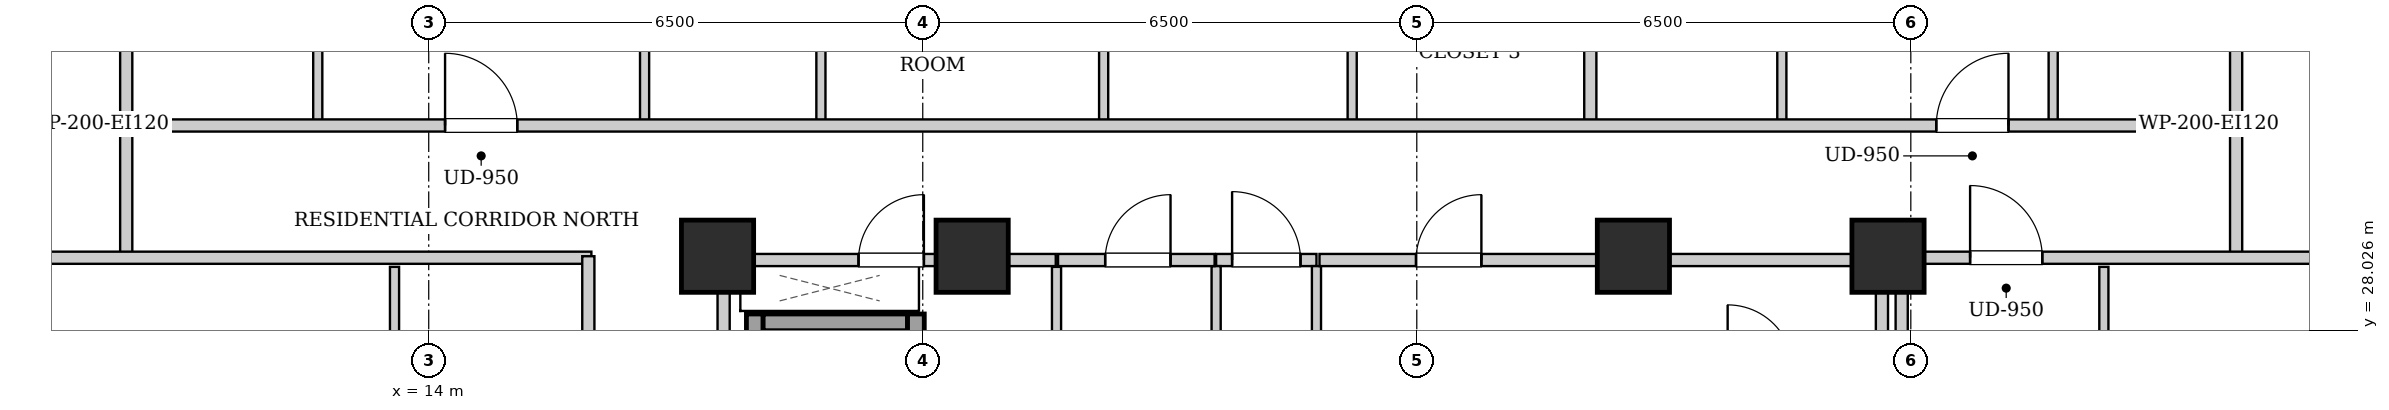
"""IFC4 building model, lengths in metres.
Left out: names, types, materials, properties, quantities, classifications, styles, units other than length and angle.
Written with IfcOpenShell. Run it as: python <this file> out.ifc"""

import sys

from ifc_helpers import new_model, si_unit, direction, frame, frame_2d, origin, origin_2d, place, context, subcontext, project, spatial, rectangle, extrude, element, fill, save


model = new_model("IFC4")
c1 = context("Model", 3, precision=1e-05, world=origin(), true_north=direction((0.0, 1.0)))
c2 = subcontext(c1, "Body", "Model", "MODEL_VIEW")
j1 = project(units=[si_unit("LENGTHUNIT", "METRE"), si_unit("PLANEANGLEUNIT", "RADIAN")], contexts=[c1])
p1 = place(None, origin())
s1 = spatial("IfcSite", under=j1, at=p1, CompositionType="ELEMENT")
p2 = place(p1, origin())
s2 = spatial("IfcBuilding", under=s1, at=p2, CompositionType="ELEMENT")
p3 = place(p2, frame((0.0, 0.0, 137.4)))
s3 = spatial("IfcBuildingStorey", under=s2, at=p3, CompositionType="ELEMENT", Elevation=137.4)
for number, where, z_axis, x_axis in (
    (1, (17.8, 29.0, 0.0), (0.0, 0.0, 1.0), (1.0, 0.0, 0.0)),
    (2, (21.15, 29.0, 0.0), (0.0, 0.0, 1.0), (1.0, 0.0, 0.0)),
    (3, (29.85, 29.0, 0.0), (0.0, 0.0, 1.0), (1.0, 0.0, 0.0)),
    (4, (33.2, 29.0, 0.0), (0.0, 0.0, 1.0), (1.0, 0.0, 0.0)),
):
    element("IfcColumn", number, at=place(p3, frame(where, z_axis=z_axis, x_axis=x_axis)), inside=s3, PredefinedType="COLUMN", context=c2, shape_type="SweptSolid", body=[
        extrude(rectangle(XDim=0.95, YDim=0.95, at=origin_2d()), origin(), (0.0, 0.0, 1.0), 3.25),
    ])
p4 = place(p3, frame((18.29, 24.1, 0.0), z_axis=(0.0, 0.0, 1.0), x_axis=(0.0, 1.0, 0.0)))
e5 = element("IfcWall", 5, at=p4, inside=s3, PredefinedType="SHEAR", context=c2, shape_type="SweptSolid", body=[
    extrude(rectangle(XDim=4.14, YDim=0.22, at=frame_2d((2.07, 0.0))), origin(), (0.0, 0.0, 1.0), 2.99),
])
p5 = place(p3, frame((18.4, 28.13, 0.0), z_axis=(0.0, 0.0, 1.0), x_axis=(1.0, 0.0, 0.0)))
e6 = element("IfcWall", 6, at=p5, inside=s3, PredefinedType="SHEAR", context=c2, shape_type="SweptSolid", body=[
    extrude(rectangle(XDim=1.9, YDim=0.22, at=frame_2d((0.95, 0.0))), origin(), (0.0, 0.0, 1.0), 2.99),
])
p6 = place(p3, frame((20.41, 26.06, 0.0), z_axis=(0.0, 0.0, 1.0), x_axis=(0.0, 1.0, 0.0)))
e7 = element("IfcWall", 7, at=p6, inside=s3, PredefinedType="SHEAR", context=c2, shape_type="SweptSolid", body=[
    extrude(rectangle(XDim=2.18, YDim=0.22, at=frame_2d((1.09, 0.0))), origin(), (0.0, 0.0, 1.0), 2.99),
])
for number, where, z_axis, x_axis in (
    (8, (17.88, 24.12, 0.0), (0.0, 0.0, 1.0), (0.0, 1.0, 0.0)),
    (9, (33.12, 24.12, 0.0), (0.0, 0.0, 1.0), (0.0, 1.0, 0.0)),
):
    element("IfcWall", number, at=place(p3, frame(where, z_axis=z_axis, x_axis=x_axis)), inside=s3, PredefinedType="PARTITIONING", context=c2, shape_type="SweptSolid", body=[
        extrude(rectangle(XDim=4.76, YDim=0.16, at=frame_2d((2.38, 0.0))), origin(), (0.0, 0.0, 1.0), 2.325),
    ])
p7 = place(p3, frame((24.36, 28.95, 0.0), z_axis=(0.0, 0.0, 1.0), x_axis=(1.0, 0.0, 0.0)))
e10 = element("IfcWall", 10, at=p7, inside=s3, PredefinedType="PARTITIONING", context=c2, shape_type="SweptSolid", body=[
    extrude(rectangle(XDim=1.32, YDim=0.16, at=frame_2d((0.66, 0.0))), origin(), (0.0, 0.0, 1.0), 2.426),
])
p8 = place(p7, frame((0.21, 0.0, 0.0)))
e11 = element("IfcOpeningElement", 11, at=p8, cuts=e10, PredefinedType="OPENING", context=c2, shape_type="SweptSolid", body=[
    extrude(rectangle(XDim=0.9, YDim=2.05, at=frame_2d((0.45, 1.025))), frame((0.0, 0.09, 0.0), z_axis=(0.0, -1.0, 0.0), x_axis=(1.0, 0.0, 0.0)), (0.0, 0.0, 1.0), 0.18),
])
p9 = place(p3, frame((17.96, 28.95, 0.0), z_axis=(0.0, 0.0, 1.0), x_axis=(1.0, 0.0, 0.0)))
e12 = element("IfcWall", 12, at=p9, inside=s3, PredefinedType="PARTITIONING", context=c2, shape_type="SweptSolid", body=[
    extrude(rectangle(XDim=4.29, YDim=0.16, at=frame_2d((2.145, 0.0))), origin(), (0.0, 0.0, 1.0), 2.426),
])
p10 = place(p9, frame((1.695, 0.0, 0.0)))
e13 = element("IfcOpeningElement", 13, at=p10, cuts=e12, PredefinedType="OPENING", context=c2, shape_type="SweptSolid", body=[
    extrude(rectangle(XDim=0.86, YDim=2.05, at=frame_2d((0.43, 1.025))), frame((0.0, 0.09, 0.0), z_axis=(0.0, -1.0, 0.0), x_axis=(1.0, 0.0, 0.0)), (0.0, 0.0, 1.0), 0.18),
])
for number, where, z_axis, x_axis in (
    (14, (24.36, 25.0, 0.0), (0.0, 0.0, 1.0), (0.0, 1.0, 0.0)),
    (15, (25.68, 25.0, 0.0), (0.0, 0.0, 1.0), (0.0, 1.0, 0.0)),
):
    element("IfcWall", number, at=place(p3, frame(where, z_axis=z_axis, x_axis=x_axis)), inside=s3, PredefinedType="PARTITIONING", context=c2, shape_type="SweptSolid", body=[
        extrude(rectangle(XDim=3.87, YDim=0.12, at=frame_2d((1.935, 0.0))), origin(), (0.0, 0.0, 1.0), 2.99),
    ])
p11 = place(p3, frame((22.26, 25.0, 0.0), z_axis=(0.0, 0.0, 1.0), x_axis=(0.0, 1.0, 0.0)))
e16 = element("IfcWall", 16, at=p11, inside=s3, PredefinedType="PARTITIONING", context=c2, shape_type="SweptSolid", body=[
    extrude(rectangle(XDim=3.86, YDim=0.12, at=frame_2d((1.93, 0.0))), origin(), (0.0, 0.0, 1.0), 2.99),
])
p12 = place(p3, frame((22.28, 28.95, 0.0), z_axis=(0.0, 0.0, 1.0), x_axis=(1.0, 0.0, 0.0)))
e17 = element("IfcWall", 17, at=p12, inside=s3, PredefinedType="PARTITIONING", context=c2, shape_type="SweptSolid", body=[
    extrude(rectangle(XDim=2.06, YDim=0.16, at=frame_2d((1.03, 0.0))), origin(), (0.0, 0.0, 1.0), 2.426),
])
p13 = place(p12, frame((0.62, 0.0, 0.0)))
e18 = element("IfcOpeningElement", 18, at=p13, cuts=e17, PredefinedType="OPENING", context=c2, shape_type="SweptSolid", body=[
    extrude(rectangle(XDim=0.86, YDim=2.05, at=frame_2d((0.43, 1.025))), frame((0.0, 0.09, 0.0), z_axis=(0.0, -1.0, 0.0), x_axis=(1.0, 0.0, 0.0)), (0.0, 0.0, 1.0), 0.18),
])
p14 = place(p3, frame((25.72, 28.95, 0.0), z_axis=(0.0, 0.0, 1.0), x_axis=(1.0, 0.0, 0.0)))
e19 = element("IfcWall", 19, at=p14, inside=s3, PredefinedType="PARTITIONING", context=c2, shape_type="SweptSolid", body=[
    extrude(rectangle(XDim=7.32, YDim=0.16, at=frame_2d((3.66, 0.0))), origin(), (0.0, 0.0, 1.0), 2.426),
])
p15 = place(p14, frame((1.27, 0.0, 0.0)))
e20 = element("IfcOpeningElement", 20, at=p15, cuts=e19, PredefinedType="OPENING", context=c2, shape_type="SweptSolid", body=[
    extrude(rectangle(XDim=0.86, YDim=2.05, at=frame_2d((0.43, 1.025))), frame((0.0, 0.09, 0.0), z_axis=(0.0, -1.0, 0.0), x_axis=(1.0, 0.0, 0.0)), (0.0, 0.0, 1.0), 0.18),
])
for number, where, z_axis, x_axis in (
    (21, (10.02, 28.98, 0.0), (0.0, 0.0, 1.0), (0.0, 1.0, 0.0)),
    (22, (37.78, 28.98, 0.0), (0.0, 0.0, 1.0), (0.0, 1.0, 0.0)),
):
    element("IfcWall", number, at=place(p3, frame(where, z_axis=z_axis, x_axis=x_axis)), inside=s3, PredefinedType="PARTITIONING", context=c2, shape_type="SweptSolid", body=[
        extrude(rectangle(XDim=1.74, YDim=0.16, at=frame_2d((0.87, 0.0))), origin(), (0.0, 0.0, 1.0), 2.99),
    ])
p16 = place(p3, frame((7.78, 28.98, 0.0), z_axis=(0.0, 0.0, 1.0), x_axis=(1.0, 0.0, 0.0)))
e23 = element("IfcWall", 23, at=p16, inside=s3, PredefinedType="PARTITIONING", context=c2, shape_type="SweptSolid", body=[
    extrude(rectangle(XDim=8.36, YDim=0.16, at=frame_2d((4.18, 0.0))), origin(), (0.0, 0.0, 1.0), 2.426),
])
p17 = place(p3, frame((10.02, 30.76, 0.0), z_axis=(0.0, 0.0, 1.0), x_axis=(0.0, 1.0, 0.0)))
e24 = element("IfcWall", 24, at=p17, inside=s3, PredefinedType="PARTITIONING", context=c2, shape_type="SweptSolid", body=[
    extrude(rectangle(XDim=2.91, YDim=0.16, at=frame_2d((1.455, 0.0))), origin(), (0.0, 0.0, 1.0), 2.99),
])
p18 = place(p3, frame((12.54, 30.76, 0.0), z_axis=(0.0, 0.0, 1.0), x_axis=(0.0, 1.0, 0.0)))
e25 = element("IfcWall", 25, at=p18, inside=s3, PredefinedType="PARTITIONING", context=c2, shape_type="SweptSolid", body=[
    extrude(rectangle(XDim=2.85, YDim=0.12, at=frame_2d((1.425, 0.0))), origin(), (0.0, 0.0, 1.0), 2.99),
])
p19 = place(p18, frame((0.995, 0.0, 0.0)))
e26 = element("IfcOpeningElement", 26, at=p19, cuts=e25, PredefinedType="OPENING", context=c2, shape_type="SweptSolid", body=[
    extrude(rectangle(XDim=0.86, YDim=2.05, at=frame_2d((0.43, 1.025))), frame((0.0, 0.07, 0.0), z_axis=(0.0, -1.0, 0.0), x_axis=(1.0, 0.0, 0.0)), (0.0, 0.0, 1.0), 0.14),
])
p20 = place(p3, frame((16.84, 30.76, 0.0), z_axis=(0.0, 0.0, 1.0), x_axis=(0.0, 1.0, 0.0)))
e27 = element("IfcWall", 27, at=p20, inside=s3, PredefinedType="PARTITIONING", context=c2, shape_type="SweptSolid", body=[
    extrude(rectangle(XDim=2.85, YDim=0.12, at=frame_2d((1.425, 0.0))), origin(), (0.0, 0.0, 1.0), 2.99),
])
p21 = place(p20, frame((0.975, 0.0, 0.0)))
e28 = element("IfcOpeningElement", 28, at=p21, cuts=e27, PredefinedType="OPENING", context=c2, shape_type="SweptSolid", body=[
    extrude(rectangle(XDim=0.9, YDim=2.05, at=frame_2d((0.45, 1.025))), frame((0.0, 0.07, 0.0), z_axis=(0.0, -1.0, 0.0), x_axis=(1.0, 0.0, 0.0)), (0.0, 0.0, 1.0), 0.14),
])
p22 = place(p3, frame((19.16, 30.76, 0.0), z_axis=(0.0, 0.0, 1.0), x_axis=(0.0, 1.0, 0.0)))
e29 = element("IfcWall", 29, at=p22, inside=s3, PredefinedType="PARTITIONING", context=c2, shape_type="SweptSolid", body=[
    extrude(rectangle(XDim=2.85, YDim=0.12, at=frame_2d((1.425, 0.0))), origin(), (0.0, 0.0, 1.0), 2.99),
])
p23 = place(p22, frame((0.975, 0.0, 0.0)))
e30 = element("IfcOpeningElement", 30, at=p23, cuts=e29, PredefinedType="OPENING", context=c2, shape_type="SweptSolid", body=[
    extrude(rectangle(XDim=0.9, YDim=2.05, at=frame_2d((0.45, 1.025))), frame((0.0, 0.07, 0.0), z_axis=(0.0, -1.0, 0.0), x_axis=(1.0, 0.0, 0.0)), (0.0, 0.0, 1.0), 0.14),
])
p24 = place(p3, frame((22.88, 30.76, 0.0), z_axis=(0.0, 0.0, 1.0), x_axis=(0.0, 1.0, 0.0)))
e31 = element("IfcWall", 31, at=p24, inside=s3, PredefinedType="PARTITIONING", context=c2, shape_type="SweptSolid", body=[
    extrude(rectangle(XDim=2.85, YDim=0.12, at=frame_2d((1.425, 0.0))), origin(), (0.0, 0.0, 1.0), 2.99),
])
p25 = place(p24, frame((0.975, 0.0, 0.0)))
e32 = element("IfcOpeningElement", 32, at=p25, cuts=e31, PredefinedType="OPENING", context=c2, shape_type="SweptSolid", body=[
    extrude(rectangle(XDim=0.9, YDim=2.05, at=frame_2d((0.45, 1.025))), frame((0.0, 0.07, 0.0), z_axis=(0.0, -1.0, 0.0), x_axis=(1.0, 0.0, 0.0)), (0.0, 0.0, 1.0), 0.14),
])
p26 = place(p3, frame((26.15, 30.76, 0.0), z_axis=(0.0, 0.0, 1.0), x_axis=(0.0, 1.0, 0.0)))
e33 = element("IfcWall", 33, at=p26, inside=s3, PredefinedType="PARTITIONING", context=c2, shape_type="SweptSolid", body=[
    extrude(rectangle(XDim=2.85, YDim=0.12, at=frame_2d((1.425, 0.0))), origin(), (0.0, 0.0, 1.0), 2.99),
])
p27 = place(p26, frame((0.975, 0.0, 0.0)))
e34 = element("IfcOpeningElement", 34, at=p27, cuts=e33, PredefinedType="OPENING", context=c2, shape_type="SweptSolid", body=[
    extrude(rectangle(XDim=0.9, YDim=2.05, at=frame_2d((0.45, 1.025))), frame((0.0, 0.07, 0.0), z_axis=(0.0, -1.0, 0.0), x_axis=(1.0, 0.0, 0.0)), (0.0, 0.0, 1.0), 0.14),
])
p28 = place(p3, frame((37.78, 30.76, 0.0), z_axis=(0.0, 0.0, 1.0), x_axis=(0.0, 1.0, 0.0)))
e35 = element("IfcWall", 35, at=p28, inside=s3, PredefinedType="PARTITIONING", context=c2, shape_type="SweptSolid", body=[
    extrude(rectangle(XDim=2.91, YDim=0.16, at=frame_2d((1.455, 0.0))), origin(), (0.0, 0.0, 1.0), 2.99),
])
p29 = place(p3, frame((29.283, 30.76, 0.0), z_axis=(0.0, 0.0, 1.0), x_axis=(0.0, 1.0, 0.0)))
e36 = element("IfcWall", 36, at=p29, inside=s3, PredefinedType="PARTITIONING", context=c2, shape_type="SweptSolid", body=[
    extrude(rectangle(XDim=12.26, YDim=0.16, at=frame_2d((6.13, 0.0))), origin(), (0.0, 0.0, 1.0), 2.99),
])
p30 = place(p3, frame((31.803, 30.76, 0.0), z_axis=(0.0, 0.0, 1.0), x_axis=(0.0, 1.0, 0.0)))
e37 = element("IfcWall", 37, at=p30, inside=s3, PredefinedType="PARTITIONING", context=c2, shape_type="SweptSolid", body=[
    extrude(rectangle(XDim=2.85, YDim=0.12, at=frame_2d((1.425, 0.0))), origin(), (0.0, 0.0, 1.0), 2.99),
])
p31 = place(p30, frame((0.995, 0.0, 0.0)))
e38 = element("IfcOpeningElement", 38, at=p31, cuts=e37, PredefinedType="OPENING", context=c2, shape_type="SweptSolid", body=[
    extrude(rectangle(XDim=0.86, YDim=2.05, at=frame_2d((0.43, 1.025))), frame((0.0, 0.07, 0.0), z_axis=(0.0, -1.0, 0.0), x_axis=(1.0, 0.0, 0.0)), (0.0, 0.0, 1.0), 0.14),
])
p32 = place(p3, frame((35.373, 30.76, 0.0), z_axis=(0.0, 0.0, 1.0), x_axis=(0.0, 1.0, 0.0)))
e39 = element("IfcWall", 39, at=p32, inside=s3, PredefinedType="PARTITIONING", context=c2, shape_type="SweptSolid", body=[
    extrude(rectangle(XDim=2.85, YDim=0.12, at=frame_2d((1.425, 0.0))), origin(), (0.0, 0.0, 1.0), 2.99),
])
p33 = place(p32, frame((0.975, 0.0, 0.0)))
e40 = element("IfcOpeningElement", 40, at=p33, cuts=e39, PredefinedType="OPENING", context=c2, shape_type="SweptSolid", body=[
    extrude(rectangle(XDim=0.9, YDim=2.05, at=frame_2d((0.45, 1.025))), frame((0.0, 0.07, 0.0), z_axis=(0.0, -1.0, 0.0), x_axis=(1.0, 0.0, 0.0)), (0.0, 0.0, 1.0), 0.14),
])
p34 = place(p3, frame((13.55, 24.552, 0.0), z_axis=(0.0, 0.0, 1.0), x_axis=(0.0, 1.0, 0.0)))
e41 = element("IfcWall", 41, at=p34, inside=s3, PredefinedType="PARTITIONING", context=c2, shape_type="SweptSolid", body=[
    extrude(rectangle(XDim=4.308, YDim=0.12, at=frame_2d((2.154, 0.0))), origin(), (0.0, 0.0, 1.0), 2.99),
])
p35 = place(p34, frame((1.704, 0.0, 0.0)))
e42 = element("IfcOpeningElement", 42, at=p35, cuts=e41, PredefinedType="OPENING", context=c2, shape_type="SweptSolid", body=[
    extrude(rectangle(XDim=0.9, YDim=2.05, at=frame_2d((0.45, 1.025))), frame((0.0, 0.07, 0.0), z_axis=(0.0, -1.0, 0.0), x_axis=(1.0, 0.0, 0.0)), (0.0, 0.0, 1.0), 0.14),
])
p36 = place(p3, frame((33.38, 28.98, 0.0), z_axis=(0.0, 0.0, 1.0), x_axis=(1.0, 0.0, 0.0)))
e43 = element("IfcWall", 43, at=p36, inside=s3, PredefinedType="PARTITIONING", context=c2, shape_type="SweptSolid", body=[
    extrude(rectangle(XDim=6.64, YDim=0.16, at=frame_2d((3.32, 0.0))), origin(), (0.0, 0.0, 1.0), 2.426),
])
p37 = place(p36, frame((0.9, 0.0, 0.0)))
e44 = element("IfcOpeningElement", 44, at=p37, cuts=e43, PredefinedType="OPENING", context=c2, shape_type="SweptSolid", body=[
    extrude(rectangle(XDim=0.95, YDim=2.1, at=frame_2d((0.475, 1.05))), frame((0.0, 0.09, 0.0), z_axis=(0.0, -1.0, 0.0), x_axis=(1.0, 0.0, 0.0)), (0.0, 0.0, 1.0), 0.18),
])
p38 = place(p3, frame((36.04, 25.052, 0.0), z_axis=(0.0, 0.0, 1.0), x_axis=(0.0, 1.0, 0.0)))
e45 = element("IfcWall", 45, at=p38, inside=s3, PredefinedType="PARTITIONING", context=c2, shape_type="SweptSolid", body=[
    extrude(rectangle(XDim=3.808, YDim=0.12, at=frame_2d((1.904, 0.0))), origin(), (0.0, 0.0, 1.0), 2.99),
])
p39 = place(p38, frame((1.454, 0.0, 0.0)))
e46 = element("IfcOpeningElement", 46, at=p39, cuts=e45, PredefinedType="OPENING", context=c2, shape_type="SweptSolid", body=[
    extrude(rectangle(XDim=0.9, YDim=2.05, at=frame_2d((0.45, 1.025))), frame((0.0, 0.07, 0.0), z_axis=(0.0, -1.0, 0.0), x_axis=(1.0, 0.0, 0.0)), (0.0, 0.0, 1.0), 0.14),
])
p40 = place(p3, frame((10.05, 30.72, 0.0), z_axis=(0.0, 0.0, 1.0), x_axis=(1.0, 0.0, 0.0)))
e47 = element("IfcWall", 47, at=p40, inside=s3, PredefinedType="PARTITIONING", context=c2, shape_type="SweptSolid", body=[
    extrude(rectangle(XDim=27.7, YDim=0.16, at=frame_2d((13.85, 0.0))), origin(), (0.0, 0.0, 1.0), 2.99),
])
p41 = place(p40, frame((4.165, 0.0, 0.0)))
e48 = element("IfcOpeningElement", 48, at=p41, cuts=e47, PredefinedType="OPENING", context=c2, shape_type="SweptSolid", body=[
    extrude(rectangle(XDim=0.95, YDim=2.1, at=frame_2d((0.475, 1.05))), frame((0.0, 0.09, 0.0), z_axis=(0.0, -1.0, 0.0), x_axis=(1.0, 0.0, 0.0)), (0.0, 0.0, 1.0), 0.18),
])
p42 = place(p40, frame((23.785, 0.0, 0.0)))
e49 = element("IfcOpeningElement", 49, at=p42, cuts=e47, PredefinedType="OPENING", context=c2, shape_type="SweptSolid", body=[
    extrude(rectangle(XDim=0.95, YDim=2.1, at=frame_2d((0.475, 1.05))), frame((0.0, 0.09, 0.0), z_axis=(0.0, -1.0, 0.0), x_axis=(1.0, 0.0, 0.0)), (0.0, 0.0, 1.0), 0.18),
])
p43 = place(p3, frame((16.1, 15.07, 0.0), z_axis=(0.0, 0.0, 1.0), x_axis=(0.0, 1.0, 0.0)))
e50 = element("IfcWall", 50, at=p43, inside=s3, PredefinedType="PARTITIONING", context=c2, shape_type="SweptSolid", body=[
    extrude(rectangle(XDim=13.93, YDim=0.16, at=frame_2d((6.965, 0.0))), origin(), (0.0, 0.0, 1.0), 2.99),
])
p44 = place(p43, frame((4.385, 0.0, 0.0)))
e51 = element("IfcOpeningElement", 51, at=p44, cuts=e50, PredefinedType="OPENING", context=c2, shape_type="SweptSolid", body=[
    extrude(rectangle(XDim=0.95, YDim=2.1, at=frame_2d((0.475, 1.05))), frame((0.0, 0.09, 0.0), z_axis=(0.0, -1.0, 0.0), x_axis=(1.0, 0.0, 0.0)), (0.0, 0.0, 1.0), 0.18),
])
p45 = place(p3, frame((33.38, 15.02, 0.0), z_axis=(0.0, 0.0, 1.0), x_axis=(0.0, 1.0, 0.0)))
e52 = element("IfcWall", 52, at=p45, inside=s3, PredefinedType="PARTITIONING", context=c2, shape_type="SweptSolid", body=[
    extrude(rectangle(XDim=13.98, YDim=0.16, at=frame_2d((6.99, 0.0))), origin(), (0.0, 0.0, 1.0), 2.325),
])
p46 = place(p8, origin())
e53 = element("IfcDoor", 53, at=p46, inside=s3, OperationType="SINGLE_SWING_LEFT", PredefinedType="DOOR", context=c2, shape_type="SweptSolid", body=[
    extrude(rectangle(XDim=0.9, YDim=2.05, at=frame_2d((0.45, 1.025))), frame((0.0, 0.025, 0.0), z_axis=(0.0, -1.0, 0.0), x_axis=(1.0, 0.0, 0.0)), (0.0, 0.0, 1.0), 0.05),
])
fill(e11, e53)
p47 = place(p10, origin())
e54 = element("IfcDoor", 54, at=p47, inside=s3, OperationType="SINGLE_SWING_RIGHT", PredefinedType="DOOR", context=c2, shape_type="SweptSolid", body=[
    extrude(rectangle(XDim=0.86, YDim=2.05, at=frame_2d((0.43, 1.025))), frame((0.0, 0.025, 0.0), z_axis=(0.0, -1.0, 0.0), x_axis=(1.0, 0.0, 0.0)), (0.0, 0.0, 1.0), 0.05),
])
fill(e13, e54)
p48 = place(p13, origin())
e55 = element("IfcDoor", 55, at=p48, inside=s3, OperationType="SINGLE_SWING_RIGHT", PredefinedType="DOOR", context=c2, shape_type="SweptSolid", body=[
    extrude(rectangle(XDim=0.86, YDim=2.05, at=frame_2d((0.43, 1.025))), frame((0.0, 0.025, 0.0), z_axis=(0.0, -1.0, 0.0), x_axis=(1.0, 0.0, 0.0)), (0.0, 0.0, 1.0), 0.05),
])
fill(e18, e55)
p49 = place(p15, origin())
e56 = element("IfcDoor", 56, at=p49, inside=s3, OperationType="SINGLE_SWING_RIGHT", PredefinedType="DOOR", context=c2, shape_type="SweptSolid", body=[
    extrude(rectangle(XDim=0.86, YDim=2.05, at=frame_2d((0.43, 1.025))), frame((0.0, 0.025, 0.0), z_axis=(0.0, -1.0, 0.0), x_axis=(1.0, 0.0, 0.0)), (0.0, 0.0, 1.0), 0.05),
])
fill(e20, e56)
p50 = place(p37, origin())
e57 = element("IfcDoor", 57, at=p50, inside=s3, OperationType="SINGLE_SWING_LEFT", PredefinedType="DOOR", context=c2, shape_type="SweptSolid", body=[
    extrude(rectangle(XDim=0.95, YDim=2.1, at=frame_2d((0.475, 1.05))), frame((0.0, 0.025, 0.0), z_axis=(0.0, -1.0, 0.0), x_axis=(1.0, 0.0, 0.0)), (0.0, 0.0, 1.0), 0.05),
])
fill(e44, e57)
p51 = place(p41, origin())
e58 = element("IfcDoor", 58, at=p51, inside=s3, OperationType="SINGLE_SWING_LEFT", PredefinedType="DOOR", context=c2, shape_type="SweptSolid", body=[
    extrude(rectangle(XDim=0.95, YDim=2.1, at=frame_2d((0.475, 1.05))), frame((0.0, 0.025, 0.0), z_axis=(0.0, -1.0, 0.0), x_axis=(1.0, 0.0, 0.0)), (0.0, 0.0, 1.0), 0.05),
])
fill(e48, e58)
p52 = place(p42, origin())
e59 = element("IfcDoor", 59, at=p52, inside=s3, OperationType="SINGLE_SWING_RIGHT", PredefinedType="DOOR", context=c2, shape_type="SweptSolid", body=[
    extrude(rectangle(XDim=0.95, YDim=2.1, at=frame_2d((0.475, 1.05))), frame((0.0, 0.025, 0.0), z_axis=(0.0, -1.0, 0.0), x_axis=(1.0, 0.0, 0.0)), (0.0, 0.0, 1.0), 0.05),
])
fill(e49, e59)
save(model, sys.argv[1])
